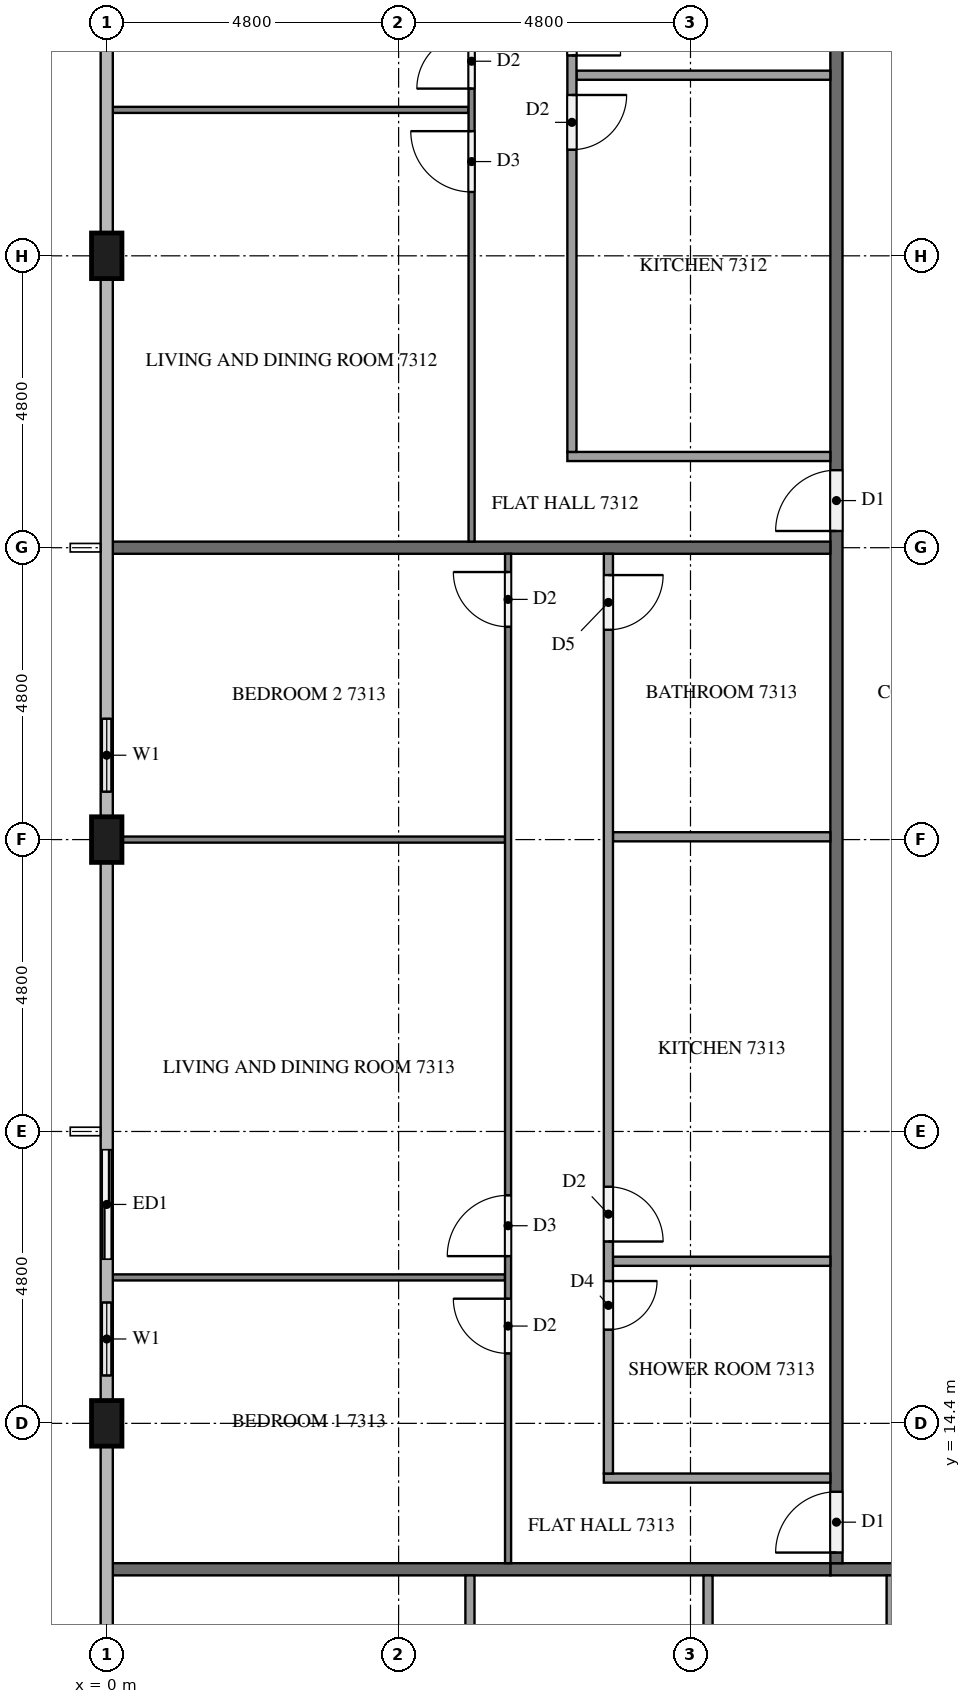
"""IFC4 building model, lengths in metres.
Left out: names, types, materials, properties, quantities, classifications, styles, units other than length and angle.
Written with IfcOpenShell. Run it as: python <this file> out.ifc"""

import sys

from ifc_helpers import new_model, si_unit, direction, frame, frame_2d, origin, origin_2d, place, context, subcontext, project, spatial, rectangle, extrude, element, fill, save


model = new_model("IFC4")
c1 = context("Model", 3, precision=1e-05, world=origin(), true_north=direction((0.0, 1.0)))
c2 = subcontext(c1, "Body", "Model", "MODEL_VIEW")
j1 = project(units=[si_unit("LENGTHUNIT", "METRE"), si_unit("PLANEANGLEUNIT", "RADIAN")], contexts=[c1])
p1 = place(None, origin())
s1 = spatial("IfcSite", under=j1, at=p1, CompositionType="ELEMENT")
p2 = place(p1, origin())
s2 = spatial("IfcBuilding", under=s1, at=p2, CompositionType="ELEMENT")
p3 = place(p2, frame((0.0, 0.0, 279.1)))
s3 = spatial("IfcBuildingStorey", under=s2, at=p3, CompositionType="ELEMENT", Elevation=279.1)
for number, where, z_axis, x_axis in (
    (1, (0.0, 33.6, 0.0), (0.0, 0.0, 1.0), (0.0, 1.0, 0.0)),
    (2, (0.0, 24.0, 0.0), (0.0, 0.0, 1.0), (0.0, 1.0, 0.0)),
    (3, (0.0, 14.4, 0.0), (0.0, 0.0, 1.0), (0.0, 1.0, 0.0)),
):
    element("IfcColumn", number, at=place(p3, frame(where, z_axis=z_axis, x_axis=x_axis)), inside=s3, PredefinedType="COLUMN", context=c2, shape_type="SweptSolid", body=[
        extrude(rectangle(XDim=0.75, YDim=0.5, at=origin_2d()), origin(), (0.0, 0.0, 1.0), 3.2),
    ])
p4 = place(p3, frame((0.0, 26.4, 0.0), z_axis=(0.0, 0.0, 1.0), x_axis=(0.0, -1.0, 0.0)))
e4 = element("IfcWall", 4, at=p4, inside=s3, PredefinedType="SOLIDWALL", context=c2, shape_type="SweptSolid", body=[
    extrude(rectangle(XDim=2.025, YDim=0.15, at=frame_2d((1.012, 0.0))), origin(), (0.0, 0.0, 1.0), 3.2),
])
p5 = place(p4, frame((0.413, 0.0, 0.9)))
e5 = element("IfcOpeningElement", 5, at=p5, cuts=e4, PredefinedType="OPENING", context=c2, shape_type="SweptSolid", body=[
    extrude(rectangle(XDim=1.2, YDim=1.4, at=frame_2d((0.6, 0.7))), frame((0.0, 0.085, 0.0), z_axis=(0.0, -1.0, 0.0), x_axis=(1.0, 0.0, 0.0)), (0.0, 0.0, 1.0), 0.17),
])
p6 = place(p3, frame((0.0, 19.2, 0.0), z_axis=(0.0, 0.0, 1.0), x_axis=(0.0, -1.0, 0.0)))
e6 = element("IfcWall", 6, at=p6, inside=s3, PredefinedType="SOLIDWALL", context=c2, shape_type="SweptSolid", body=[
    extrude(rectangle(XDim=4.425, YDim=0.15, at=frame_2d((2.212, 0.0))), origin(), (0.0, 0.0, 1.0), 3.2),
])
p7 = place(p6, frame((0.3, 0.0, 0.0)))
e7 = element("IfcOpeningElement", 7, at=p7, cuts=e6, PredefinedType="OPENING", context=c2, shape_type="SweptSolid", body=[
    extrude(rectangle(XDim=1.8, YDim=2.4, at=frame_2d((0.9, 1.2))), frame((0.0, 0.085, 0.0), z_axis=(0.0, -1.0, 0.0), x_axis=(1.0, 0.0, 0.0)), (0.0, 0.0, 1.0), 0.17),
])
p8 = place(p6, frame((2.812, 0.0, 0.9)))
e8 = element("IfcOpeningElement", 8, at=p8, cuts=e6, PredefinedType="OPENING", context=c2, shape_type="SweptSolid", body=[
    extrude(rectangle(XDim=1.2, YDim=1.4, at=frame_2d((0.6, 0.7))), frame((0.0, 0.085, 0.0), z_axis=(0.0, -1.0, 0.0), x_axis=(1.0, 0.0, 0.0)), (0.0, 0.0, 1.0), 0.17),
])
p9 = place(p3, frame((50.5, 12.0, 0.0), z_axis=(0.0, 0.0, 1.0), x_axis=(-1.0, 0.0, 0.0)))
e9 = element("IfcWall", 9, at=p9, inside=s3, PredefinedType="PARTITIONING", context=c2, shape_type="SweptSolid", body=[
    extrude(rectangle(XDim=38.6, YDim=0.2, at=frame_2d((19.3, 0.0))), origin(), (0.0, 0.0, 1.0), 3.2),
])
p10 = place(p9, frame((36.375, 0.0, 0.0)))
e10 = element("IfcOpeningElement", 10, at=p10, cuts=e9, PredefinedType="OPENING", context=c2, shape_type="SweptSolid", body=[
    extrude(rectangle(XDim=1.0, YDim=2.1, at=frame_2d((0.5, 1.05))), frame((0.0, 0.11, 0.0), z_axis=(0.0, -1.0, 0.0), x_axis=(1.0, 0.0, 0.0)), (0.0, 0.0, 1.0), 0.22),
])
p11 = place(p9, frame((29.175, 0.0, 0.0)))
e11 = element("IfcOpeningElement", 11, at=p11, cuts=e9, PredefinedType="OPENING", context=c2, shape_type="SweptSolid", body=[
    extrude(rectangle(XDim=1.0, YDim=2.1, at=frame_2d((0.5, 1.05))), frame((0.0, 0.11, 0.0), z_axis=(0.0, -1.0, 0.0), x_axis=(1.0, 0.0, 0.0)), (0.0, 0.0, 1.0), 0.22),
])
p12 = place(p9, frame((27.625, 0.0, 0.0)))
e12 = element("IfcOpeningElement", 12, at=p12, cuts=e9, PredefinedType="OPENING", context=c2, shape_type="SweptSolid", body=[
    extrude(rectangle(XDim=1.0, YDim=2.1, at=frame_2d((0.5, 1.05))), frame((0.0, 0.11, 0.0), z_axis=(0.0, -1.0, 0.0), x_axis=(1.0, 0.0, 0.0)), (0.0, 0.0, 1.0), 0.22),
])
p13 = place(p9, frame((2.775, 0.0, 0.0)))
e13 = element("IfcOpeningElement", 13, at=p13, cuts=e9, PredefinedType="OPENING", context=c2, shape_type="SweptSolid", body=[
    extrude(rectangle(XDim=1.0, YDim=2.1, at=frame_2d((0.5, 1.05))), frame((0.0, 0.11, 0.0), z_axis=(0.0, -1.0, 0.0), x_axis=(1.0, 0.0, 0.0)), (0.0, 0.0, 1.0), 0.22),
])
p14 = place(p9, frame((1.225, 0.0, 0.0)))
e14 = element("IfcOpeningElement", 14, at=p14, cuts=e9, PredefinedType="OPENING", context=c2, shape_type="SweptSolid", body=[
    extrude(rectangle(XDim=1.0, YDim=2.1, at=frame_2d((0.5, 1.05))), frame((0.0, 0.11, 0.0), z_axis=(0.0, -1.0, 0.0), x_axis=(1.0, 0.0, 0.0)), (0.0, 0.0, 1.0), 0.22),
])
p15 = place(p3, frame((12.0, 12.1, 0.0), z_axis=(0.0, 0.0, 1.0), x_axis=(0.0, 1.0, 0.0)))
e15 = element("IfcWall", 15, at=p15, inside=s3, PredefinedType="PARTITIONING", context=c2, shape_type="SweptSolid", body=[
    extrude(rectangle(XDim=28.6, YDim=0.2, at=frame_2d((14.3, 0.0))), origin(), (0.0, 0.0, 1.0), 3.2),
])
p16 = place(p15, frame((16.975, 0.0, 0.0)))
e16 = element("IfcOpeningElement", 16, at=p16, cuts=e15, PredefinedType="OPENING", context=c2, shape_type="SweptSolid", body=[
    extrude(rectangle(XDim=1.0, YDim=2.1, at=frame_2d((0.5, 1.05))), frame((0.0, 0.11, 0.0), z_axis=(0.0, -1.0, 0.0), x_axis=(1.0, 0.0, 0.0)), (0.0, 0.0, 1.0), 0.22),
])
p17 = place(p15, frame((0.175, 0.0, 0.0)))
e17 = element("IfcOpeningElement", 17, at=p17, cuts=e15, PredefinedType="OPENING", context=c2, shape_type="SweptSolid", body=[
    extrude(rectangle(XDim=1.0, YDim=2.1, at=frame_2d((0.5, 1.05))), frame((0.0, 0.11, 0.0), z_axis=(0.0, -1.0, 0.0), x_axis=(1.0, 0.0, 0.0)), (0.0, 0.0, 1.0), 0.22),
])
for number, where, z_axis, x_axis in (
    (18, (0.1, 12.0, 0.0), (0.0, 0.0, 1.0), (1.0, 0.0, 0.0)),
    (19, (0.1, 28.8, 0.0), (0.0, 0.0, 1.0), (1.0, 0.0, 0.0)),
):
    element("IfcWall", number, at=place(p3, frame(where, z_axis=z_axis, x_axis=x_axis)), inside=s3, PredefinedType="PARTITIONING", context=c2, shape_type="SweptSolid", body=[
        extrude(rectangle(XDim=11.8, YDim=0.2, at=frame_2d((5.9, 0.0))), origin(), (0.0, 0.0, 1.0), 3.2),
    ])
for number, where, z_axis, x_axis in (
    (20, (9.888, 11.9, 0.0), (0.0, 0.0, 1.0), (0.0, -1.0, 0.0)),
    (21, (5.973, 11.9, 0.0), (0.0, 0.0, 1.0), (0.0, -1.0, 0.0)),
):
    element("IfcWall", number, at=place(p3, frame(where, z_axis=z_axis, x_axis=x_axis)), inside=s3, PredefinedType="PARTITIONING", context=c2, shape_type="SweptSolid", body=[
        extrude(rectangle(XDim=2.975, YDim=0.15, at=frame_2d((1.487, 0.0))), origin(), (0.0, 0.0, 1.0), 3.2),
    ])
p18 = place(p3, frame((12.9, 11.9, 0.0), z_axis=(0.0, 0.0, 1.0), x_axis=(0.0, -1.0, 0.0)))
e22 = element("IfcWall", 22, at=p18, inside=s3, PredefinedType="PARTITIONING", context=c2, shape_type="SweptSolid", body=[
    extrude(rectangle(XDim=3.125, YDim=0.15, at=frame_2d((1.562, 0.0))), origin(), (0.0, 0.0, 1.0), 3.2),
])
p19 = place(p3, frame((5.95, 36.0, 0.0), z_axis=(0.0, 0.0, 1.0), x_axis=(-1.0, 0.0, 0.0)))
e23 = element("IfcWall", 23, at=p19, inside=s3, PredefinedType="PARTITIONING", context=c2, shape_type="SweptSolid", body=[
    extrude(rectangle(XDim=5.85, YDim=0.1, at=frame_2d((2.925, 0.0))), origin(), (0.0, 0.0, 1.0), 3.2),
])
p20 = place(p3, frame((6.0, 28.9, 0.0), z_axis=(0.0, 0.0, 1.0), x_axis=(0.0, 1.0, 0.0)))
e24 = element("IfcWall", 24, at=p20, inside=s3, PredefinedType="PARTITIONING", context=c2, shape_type="SweptSolid", body=[
    extrude(rectangle(XDim=11.8, YDim=0.1, at=frame_2d((5.9, 0.0))), origin(), (0.0, 0.0, 1.0), 3.2),
])
p21 = place(p20, frame((5.75, 0.0, 0.0)))
e25 = element("IfcOpeningElement", 25, at=p21, cuts=e24, PredefinedType="OPENING", context=c2, shape_type="SweptSolid", body=[
    extrude(rectangle(XDim=1.0, YDim=2.1, at=frame_2d((0.5, 1.05))), frame((0.0, 0.06, 0.0), z_axis=(0.0, -1.0, 0.0), x_axis=(1.0, 0.0, 0.0)), (0.0, 0.0, 1.0), 0.12),
])
p22 = place(p20, frame((7.45, 0.0, 0.0)))
e26 = element("IfcOpeningElement", 26, at=p22, cuts=e24, PredefinedType="OPENING", context=c2, shape_type="SweptSolid", body=[
    extrude(rectangle(XDim=0.9, YDim=2.1, at=frame_2d((0.45, 1.05))), frame((0.0, 0.06, 0.0), z_axis=(0.0, -1.0, 0.0), x_axis=(1.0, 0.0, 0.0)), (0.0, 0.0, 1.0), 0.12),
])
p23 = place(p3, frame((11.9, 36.57, 0.0), z_axis=(0.0, 0.0, 1.0), x_axis=(-1.0, 0.0, 0.0)))
e27 = element("IfcWall", 27, at=p23, inside=s3, PredefinedType="PARTITIONING", context=c2, shape_type="SweptSolid", body=[
    extrude(rectangle(XDim=4.175, YDim=0.15, at=frame_2d((2.087, 0.0))), origin(), (0.0, 0.0, 1.0), 3.2),
])
p24 = place(p3, frame((11.9, 30.3, 0.0), z_axis=(0.0, 0.0, 1.0), x_axis=(-1.0, 0.0, 0.0)))
e28 = element("IfcWall", 28, at=p24, inside=s3, PredefinedType="PARTITIONING", context=c2, shape_type="SweptSolid", body=[
    extrude(rectangle(XDim=4.325, YDim=0.15, at=frame_2d((2.163, 0.0))), origin(), (0.0, 0.0, 1.0), 3.2),
])
p25 = place(p3, frame((7.65, 40.7, 0.0), z_axis=(0.0, 0.0, 1.0), x_axis=(0.0, -1.0, 0.0)))
e29 = element("IfcWall", 29, at=p25, inside=s3, PredefinedType="PARTITIONING", context=c2, shape_type="SweptSolid", body=[
    extrude(rectangle(XDim=10.325, YDim=0.15, at=frame_2d((5.163, 0.0))), origin(), (0.0, 0.0, 1.0), 3.2),
])
p26 = place(p25, frame((4.455, 0.0, 0.0)))
e30 = element("IfcOpeningElement", 30, at=p26, cuts=e29, PredefinedType="OPENING", context=c2, shape_type="SweptSolid", body=[
    extrude(rectangle(XDim=0.9, YDim=2.1, at=frame_2d((0.45, 1.05))), frame((0.0, 0.085, 0.0), z_axis=(0.0, -1.0, 0.0), x_axis=(1.0, 0.0, 0.0)), (0.0, 0.0, 1.0), 0.17),
])
p27 = place(p25, frame((3.005, 0.0, 0.0)))
e31 = element("IfcOpeningElement", 31, at=p27, cuts=e29, PredefinedType="OPENING", context=c2, shape_type="SweptSolid", body=[
    extrude(rectangle(XDim=0.8, YDim=2.1, at=frame_2d((0.4, 1.05))), frame((0.0, 0.085, 0.0), z_axis=(0.0, -1.0, 0.0), x_axis=(1.0, 0.0, 0.0)), (0.0, 0.0, 1.0), 0.17),
])
p28 = place(p3, frame((6.55, 16.8, 0.0), z_axis=(0.0, 0.0, 1.0), x_axis=(-1.0, 0.0, 0.0)))
e32 = element("IfcWall", 32, at=p28, inside=s3, PredefinedType="PARTITIONING", context=c2, shape_type="SweptSolid", body=[
    extrude(rectangle(XDim=6.45, YDim=0.1, at=frame_2d((3.225, 0.0))), origin(), (0.0, 0.0, 1.0), 3.2),
])
p29 = place(p3, frame((6.55, 24.0, 0.0), z_axis=(0.0, 0.0, 1.0), x_axis=(-1.0, 0.0, 0.0)))
e33 = element("IfcWall", 33, at=p29, inside=s3, PredefinedType="PARTITIONING", context=c2, shape_type="SweptSolid", body=[
    extrude(rectangle(XDim=6.3, YDim=0.1, at=frame_2d((3.15, 0.0))), origin(), (0.0, 0.0, 1.0), 3.2),
])
p30 = place(p3, frame((6.6, 12.1, 0.0), z_axis=(0.0, 0.0, 1.0), x_axis=(0.0, 1.0, 0.0)))
e34 = element("IfcWall", 34, at=p30, inside=s3, PredefinedType="PARTITIONING", context=c2, shape_type="SweptSolid", body=[
    extrude(rectangle(XDim=16.6, YDim=0.1, at=frame_2d((8.3, 0.0))), origin(), (0.0, 0.0, 1.0), 3.2),
])
p31 = place(p30, frame((3.45, 0.0, 0.0)))
e35 = element("IfcOpeningElement", 35, at=p31, cuts=e34, PredefinedType="OPENING", context=c2, shape_type="SweptSolid", body=[
    extrude(rectangle(XDim=0.9, YDim=2.1, at=frame_2d((0.45, 1.05))), frame((0.0, 0.06, 0.0), z_axis=(0.0, -1.0, 0.0), x_axis=(1.0, 0.0, 0.0)), (0.0, 0.0, 1.0), 0.12),
])
p32 = place(p30, frame((5.05, 0.0, 0.0)))
e36 = element("IfcOpeningElement", 36, at=p32, cuts=e34, PredefinedType="OPENING", context=c2, shape_type="SweptSolid", body=[
    extrude(rectangle(XDim=1.0, YDim=2.1, at=frame_2d((0.5, 1.05))), frame((0.0, 0.06, 0.0), z_axis=(0.0, -1.0, 0.0), x_axis=(1.0, 0.0, 0.0)), (0.0, 0.0, 1.0), 0.12),
])
p33 = place(p30, frame((15.4, 0.0, 0.0)))
e37 = element("IfcOpeningElement", 37, at=p33, cuts=e34, PredefinedType="OPENING", context=c2, shape_type="SweptSolid", body=[
    extrude(rectangle(XDim=0.9, YDim=2.1, at=frame_2d((0.45, 1.05))), frame((0.0, 0.06, 0.0), z_axis=(0.0, -1.0, 0.0), x_axis=(1.0, 0.0, 0.0)), (0.0, 0.0, 1.0), 0.12),
])
for number, where, z_axis, x_axis in (
    (38, (11.9, 17.065, 0.0), (0.0, 0.0, 1.0), (-1.0, 0.0, 0.0)),
    (39, (11.9, 24.046, 0.0), (0.0, 0.0, 1.0), (-1.0, 0.0, 0.0)),
):
    element("IfcWall", number, at=place(p3, frame(where, z_axis=z_axis, x_axis=x_axis)), inside=s3, PredefinedType="PARTITIONING", context=c2, shape_type="SweptSolid", body=[
        extrude(rectangle(XDim=3.575, YDim=0.15, at=frame_2d((1.788, 0.0))), origin(), (0.0, 0.0, 1.0), 3.2),
    ])
p34 = place(p3, frame((11.9, 13.5, 0.0), z_axis=(0.0, 0.0, 1.0), x_axis=(-1.0, 0.0, 0.0)))
e40 = element("IfcWall", 40, at=p34, inside=s3, PredefinedType="PARTITIONING", context=c2, shape_type="SweptSolid", body=[
    extrude(rectangle(XDim=3.725, YDim=0.15, at=frame_2d((1.862, 0.0))), origin(), (0.0, 0.0, 1.0), 3.2),
])
p35 = place(p3, frame((8.25, 28.7, 0.0), z_axis=(0.0, 0.0, 1.0), x_axis=(0.0, -1.0, 0.0)))
e41 = element("IfcWall", 41, at=p35, inside=s3, PredefinedType="PARTITIONING", context=c2, shape_type="SweptSolid", body=[
    extrude(rectangle(XDim=15.125, YDim=0.15, at=frame_2d((7.562, 0.0))), origin(), (0.0, 0.0, 1.0), 3.2),
])
p36 = place(p35, frame((11.96, 0.0, 0.0)))
e42 = element("IfcOpeningElement", 42, at=p36, cuts=e41, PredefinedType="OPENING", context=c2, shape_type="SweptSolid", body=[
    extrude(rectangle(XDim=0.8, YDim=2.1, at=frame_2d((0.4, 1.05))), frame((0.0, 0.085, 0.0), z_axis=(0.0, -1.0, 0.0), x_axis=(1.0, 0.0, 0.0)), (0.0, 0.0, 1.0), 0.17),
])
p37 = place(p35, frame((10.41, 0.0, 0.0)))
e43 = element("IfcOpeningElement", 43, at=p37, cuts=e41, PredefinedType="OPENING", context=c2, shape_type="SweptSolid", body=[
    extrude(rectangle(XDim=0.9, YDim=2.1, at=frame_2d((0.45, 1.05))), frame((0.0, 0.085, 0.0), z_axis=(0.0, -1.0, 0.0), x_axis=(1.0, 0.0, 0.0)), (0.0, 0.0, 1.0), 0.17),
])
p38 = place(p35, frame((0.35, 0.0, 0.0)))
e44 = element("IfcOpeningElement", 44, at=p38, cuts=e41, PredefinedType="OPENING", context=c2, shape_type="SweptSolid", body=[
    extrude(rectangle(XDim=0.9, YDim=2.1, at=frame_2d((0.45, 1.05))), frame((0.0, 0.085, 0.0), z_axis=(0.0, -1.0, 0.0), x_axis=(1.0, 0.0, 0.0)), (0.0, 0.0, 1.0), 0.17),
])
p39 = place(p5, origin())
e45 = element("IfcWindow", 45, at=p39, inside=s3, PartitioningType="SINGLE_PANEL", PredefinedType="WINDOW", context=c2, shape_type="SweptSolid", body=[
    extrude(rectangle(XDim=1.2, YDim=1.4, at=frame_2d((0.6, 0.7))), frame((0.0, 0.03, 0.0), z_axis=(0.0, -1.0, 0.0), x_axis=(1.0, 0.0, 0.0)), (0.0, 0.0, 1.0), 0.06),
])
fill(e5, e45)
p40 = place(p7, origin())
e46 = element("IfcDoor", 46, at=p40, inside=s3, OperationType="SLIDING_TO_LEFT", PredefinedType="DOOR", context=c2, shape_type="SweptSolid", body=[
    extrude(rectangle(XDim=1.8, YDim=2.4, at=frame_2d((0.9, 1.2))), frame((0.0, 0.025, 0.0), z_axis=(0.0, -1.0, 0.0), x_axis=(1.0, 0.0, 0.0)), (0.0, 0.0, 1.0), 0.05),
])
fill(e7, e46)
p41 = place(p8, origin())
e47 = element("IfcWindow", 47, at=p41, inside=s3, PartitioningType="SINGLE_PANEL", PredefinedType="WINDOW", context=c2, shape_type="SweptSolid", body=[
    extrude(rectangle(XDim=1.2, YDim=1.4, at=frame_2d((0.6, 0.7))), frame((0.0, 0.03, 0.0), z_axis=(0.0, -1.0, 0.0), x_axis=(1.0, 0.0, 0.0)), (0.0, 0.0, 1.0), 0.06),
])
fill(e8, e47)
p42 = place(p16, origin())
e48 = element("IfcDoor", 48, at=p42, inside=s3, OperationType="SINGLE_SWING_LEFT", PredefinedType="DOOR", context=c2, shape_type="SweptSolid", body=[
    extrude(rectangle(XDim=1.0, YDim=2.1, at=frame_2d((0.5, 1.05))), frame((0.0, 0.025, 0.0), z_axis=(0.0, -1.0, 0.0), x_axis=(1.0, 0.0, 0.0)), (0.0, 0.0, 1.0), 0.05),
])
fill(e16, e48)
p43 = place(p17, origin())
e49 = element("IfcDoor", 49, at=p43, inside=s3, OperationType="SINGLE_SWING_LEFT", PredefinedType="DOOR", context=c2, shape_type="SweptSolid", body=[
    extrude(rectangle(XDim=1.0, YDim=2.1, at=frame_2d((0.5, 1.05))), frame((0.0, 0.025, 0.0), z_axis=(0.0, -1.0, 0.0), x_axis=(1.0, 0.0, 0.0)), (0.0, 0.0, 1.0), 0.05),
])
fill(e17, e49)
p44 = place(p21, origin())
e50 = element("IfcDoor", 50, at=p44, inside=s3, OperationType="SINGLE_SWING_RIGHT", PredefinedType="DOOR", context=c2, shape_type="SweptSolid", body=[
    extrude(rectangle(XDim=1.0, YDim=2.1, at=frame_2d((0.5, 1.05))), frame((0.0, 0.025, 0.0), z_axis=(0.0, -1.0, 0.0), x_axis=(1.0, 0.0, 0.0)), (0.0, 0.0, 1.0), 0.05),
])
fill(e25, e50)
p45 = place(p22, origin())
e51 = element("IfcDoor", 51, at=p45, inside=s3, OperationType="SINGLE_SWING_LEFT", PredefinedType="DOOR", context=c2, shape_type="SweptSolid", body=[
    extrude(rectangle(XDim=0.9, YDim=2.1, at=frame_2d((0.45, 1.05))), frame((0.0, 0.025, 0.0), z_axis=(0.0, -1.0, 0.0), x_axis=(1.0, 0.0, 0.0)), (0.0, 0.0, 1.0), 0.05),
])
fill(e26, e51)
p46 = place(p26, origin())
e52 = element("IfcDoor", 52, at=p46, inside=s3, OperationType="SINGLE_SWING_LEFT", PredefinedType="DOOR", context=c2, shape_type="SweptSolid", body=[
    extrude(rectangle(XDim=0.9, YDim=2.1, at=frame_2d((0.45, 1.05))), frame((0.0, 0.025, 0.0), z_axis=(0.0, -1.0, 0.0), x_axis=(1.0, 0.0, 0.0)), (0.0, 0.0, 1.0), 0.05),
])
fill(e30, e52)
p47 = place(p27, origin())
e53 = element("IfcDoor", 53, at=p47, inside=s3, OperationType="SINGLE_SWING_RIGHT", PredefinedType="DOOR", context=c2, shape_type="SweptSolid", body=[
    extrude(rectangle(XDim=0.8, YDim=2.1, at=frame_2d((0.4, 1.05))), frame((0.0, 0.025, 0.0), z_axis=(0.0, -1.0, 0.0), x_axis=(1.0, 0.0, 0.0)), (0.0, 0.0, 1.0), 0.05),
])
fill(e31, e53)
p48 = place(p31, origin())
e54 = element("IfcDoor", 54, at=p48, inside=s3, OperationType="SINGLE_SWING_RIGHT", PredefinedType="DOOR", context=c2, shape_type="SweptSolid", body=[
    extrude(rectangle(XDim=0.9, YDim=2.1, at=frame_2d((0.45, 1.05))), frame((0.0, 0.025, 0.0), z_axis=(0.0, -1.0, 0.0), x_axis=(1.0, 0.0, 0.0)), (0.0, 0.0, 1.0), 0.05),
])
fill(e35, e54)
p49 = place(p32, origin())
e55 = element("IfcDoor", 55, at=p49, inside=s3, OperationType="SINGLE_SWING_LEFT", PredefinedType="DOOR", context=c2, shape_type="SweptSolid", body=[
    extrude(rectangle(XDim=1.0, YDim=2.1, at=frame_2d((0.5, 1.05))), frame((0.0, 0.025, 0.0), z_axis=(0.0, -1.0, 0.0), x_axis=(1.0, 0.0, 0.0)), (0.0, 0.0, 1.0), 0.05),
])
fill(e36, e55)
p50 = place(p33, origin())
e56 = element("IfcDoor", 56, at=p50, inside=s3, OperationType="SINGLE_SWING_RIGHT", PredefinedType="DOOR", context=c2, shape_type="SweptSolid", body=[
    extrude(rectangle(XDim=0.9, YDim=2.1, at=frame_2d((0.45, 1.05))), frame((0.0, 0.025, 0.0), z_axis=(0.0, -1.0, 0.0), x_axis=(1.0, 0.0, 0.0)), (0.0, 0.0, 1.0), 0.05),
])
fill(e37, e56)
p51 = place(p36, origin())
e57 = element("IfcDoor", 57, at=p51, inside=s3, OperationType="SINGLE_SWING_LEFT", PredefinedType="DOOR", context=c2, shape_type="SweptSolid", body=[
    extrude(rectangle(XDim=0.8, YDim=2.1, at=frame_2d((0.4, 1.05))), frame((0.0, 0.025, 0.0), z_axis=(0.0, -1.0, 0.0), x_axis=(1.0, 0.0, 0.0)), (0.0, 0.0, 1.0), 0.05),
])
fill(e42, e57)
p52 = place(p37, origin())
e58 = element("IfcDoor", 58, at=p52, inside=s3, OperationType="SINGLE_SWING_RIGHT", PredefinedType="DOOR", context=c2, shape_type="SweptSolid", body=[
    extrude(rectangle(XDim=0.9, YDim=2.1, at=frame_2d((0.45, 1.05))), frame((0.0, 0.025, 0.0), z_axis=(0.0, -1.0, 0.0), x_axis=(1.0, 0.0, 0.0)), (0.0, 0.0, 1.0), 0.05),
])
fill(e43, e58)
p53 = place(p38, origin())
e59 = element("IfcDoor", 59, at=p53, inside=s3, OperationType="SINGLE_SWING_LEFT", PredefinedType="DOOR", context=c2, shape_type="SweptSolid", body=[
    extrude(rectangle(XDim=0.9, YDim=2.1, at=frame_2d((0.45, 1.05))), frame((0.0, 0.025, 0.0), z_axis=(0.0, -1.0, 0.0), x_axis=(1.0, 0.0, 0.0)), (0.0, 0.0, 1.0), 0.05),
])
fill(e44, e59)
save(model, sys.argv[1])
